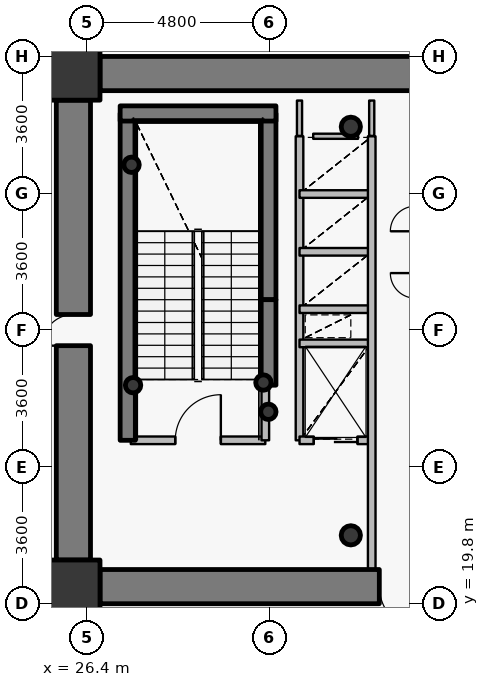
"""IFC4 building model, lengths in metres.
Left out: names, types, materials, properties, quantities, classifications, styles, units other than length and angle.
Written with IfcOpenShell. Run it as: python <this file> out.ifc"""

import sys

from ifc_helpers import new_model, si_unit, direction, frame, frame_2d, origin, origin_2d, place, context, subcontext, project, spatial, rectangle, hollow_circle, extrude, source, transform, mapped, element, fill, save


model = new_model("IFC4")
c1 = context("Model", 3, precision=1e-05, world=origin(), true_north=direction((0.0, 1.0)))
c2 = subcontext(c1, "Body", "Model", "MODEL_VIEW")
j1 = project(units=[si_unit("LENGTHUNIT", "METRE"), si_unit("PLANEANGLEUNIT", "RADIAN")], contexts=[c1])
p1 = place(None, origin())
s1 = spatial("IfcSite", under=j1, at=p1, CompositionType="ELEMENT")
p2 = place(p1, origin())
s2 = spatial("IfcBuilding", under=s1, at=p2, CompositionType="ELEMENT")
p3 = place(p2, frame((0.0, 0.0, 10.2)))
s3 = spatial("IfcBuildingStorey", under=s2, at=p3, CompositionType="ELEMENT", Elevation=10.2)
for number, where, z_axis, x_axis in (
    (1, (26.05, 20.25, 0.0), (0.0, 0.0, 1.0), (1.0, 0.0, 0.0)),
    (2, (26.05, 33.75, 0.0), (0.0, 0.0, 1.0), (1.0, 0.0, 0.0)),
):
    element("IfcColumn", number, at=place(p3, frame(where, z_axis=z_axis, x_axis=x_axis)), inside=s3, PredefinedType="COLUMN", context=c2, shape_type="SweptSolid", body=[
        extrude(rectangle(XDim=1.4, YDim=1.4, at=origin_2d()), origin(), (0.0, 0.0, 1.0), 4.2),
    ])
for number, where, z_axis, x_axis in (
    (3, (33.35, 21.6, 0.0), (0.0, 0.0, 1.0), (1.0, 0.0, 0.0)),
    (4, (33.35, 32.35, 0.0), (0.0, 0.0, 1.0), (1.0, 0.0, 0.0)),
):
    element("IfcColumn", number, at=place(p3, frame(where, z_axis=z_axis, x_axis=x_axis)), inside=s3, PredefinedType="COLUMN", context=c2, shape_type="SweptSolid", body=[
        extrude(hollow_circle(Radius=0.254, WallThickness=0.02, at=origin_2d()), origin(), (0.0, 0.0, 1.0), 4.2),
    ])
p4 = place(p3, frame((27.48, 24.1, 0.0), z_axis=(0.0, 0.0, 1.0), x_axis=(0.0, 1.0, 0.0)))
e5 = element("IfcWall", 5, at=p4, inside=s3, PredefinedType="SHEAR", context=c2, shape_type="SweptSolid", body=[
    extrude(rectangle(XDim=8.6, YDim=0.4, at=frame_2d((4.3, 0.0))), origin(), (0.0, 0.0, 1.0), 4.2),
])
p5 = place(p3, frame((31.18, 27.8, 0.0), z_axis=(0.0, 0.0, 1.0), x_axis=(0.0, 1.0, 0.0)))
e6 = element("IfcWall", 6, at=p5, inside=s3, PredefinedType="SHEAR", context=c2, shape_type="SweptSolid", body=[
    extrude(rectangle(XDim=4.9, YDim=0.4, at=frame_2d((2.45, 0.0))), origin(), (0.0, 0.0, 1.0), 4.2),
])
p6 = place(p3, frame((27.28, 32.7, 0.0), z_axis=(0.0, 0.0, 1.0), x_axis=(1.0, 0.0, 0.0)))
e7 = element("IfcWall", 7, at=p6, inside=s3, PredefinedType="SHEAR", context=c2, shape_type="SweptSolid", body=[
    extrude(rectangle(XDim=4.1, YDim=0.4, at=frame_2d((2.05, 0.0))), origin(), (0.0, 0.0, 1.0), 4.2),
])
for number, where, z_axis, x_axis in (
    (8, (27.58, 31.35, 0.0), (0.0, 0.0, 1.0), (1.0, 0.0, 0.0)),
    (9, (31.05, 25.62, 0.0), (0.0, 0.0, 1.0), (1.0, 0.0, 0.0)),
    (10, (31.18, 24.85, 0.0), (0.0, 0.0, 1.0), (1.0, 0.0, 0.0)),
    (11, (27.62, 25.55, 0.0), (0.0, 0.0, 1.0), (1.0, 0.0, 0.0)),
):
    element("IfcColumn", number, at=place(p3, frame(where, z_axis=z_axis, x_axis=x_axis)), inside=s3, PredefinedType="COLUMN", context=c2, shape_type="SweptSolid", body=[
        extrude(hollow_circle(Radius=0.203, WallThickness=0.016, at=origin_2d()), origin(), (0.0, 0.0, 1.0), 4.2),
    ])
p7 = place(p3, frame((26.75, 33.75, 0.0), z_axis=(0.0, 0.0, 1.0), x_axis=(1.0, 0.0, 0.0)))
e12 = element("IfcWall", 12, at=p7, inside=s3, PredefinedType="SHEAR", context=c2, shape_type="SweptSolid", body=[
    extrude(rectangle(XDim=18.5, YDim=0.9, at=frame_2d((9.25, 0.0))), origin(), (0.0, 0.0, 1.0), 3.35),
])
p8 = place(p3, frame((45.25, 20.25, 0.0), z_axis=(0.0, 0.0, 1.0), x_axis=(-1.0, 0.0, 0.0)))
e13 = element("IfcWall", 13, at=p8, inside=s3, PredefinedType="SHEAR", context=c2, shape_type="SweptSolid", body=[
    extrude(rectangle(XDim=18.5, YDim=0.9, at=frame_2d((9.25, 0.0))), origin(), (0.0, 0.0, 1.0), 3.35),
])
p9 = place(p8, frame((10.0, 0.0, 0.0)))
e14 = element("IfcOpeningElement", 14, at=p9, cuts=e13, PredefinedType="OPENING", context=c2, shape_type="SweptSolid", body=[
    extrude(rectangle(XDim=1.15, YDim=2.15, at=origin_2d()), frame((0.575, 0.46, 1.075), z_axis=(0.0, -1.0, 0.0), x_axis=(1.0, 0.0, 0.0)), (0.0, 0.0, 1.0), 0.92),
])
p10 = place(p3, frame((26.05, 20.95, 0.0), z_axis=(0.0, 0.0, 1.0), x_axis=(0.0, 1.0, 0.0)))
e15 = element("IfcWall", 15, at=p10, inside=s3, PredefinedType="SHEAR", context=c2, shape_type="SweptSolid", body=[
    extrude(rectangle(XDim=12.1, YDim=0.9, at=frame_2d((6.05, 0.0))), origin(), (0.0, 0.0, 1.0), 3.35),
])
p11 = place(p10, frame((5.64, 0.0, 0.0)))
e16 = element("IfcOpeningElement", 16, at=p11, cuts=e15, PredefinedType="OPENING", context=c2, shape_type="SweptSolid", body=[
    extrude(rectangle(XDim=0.82, YDim=2.1, at=origin_2d()), frame((0.41, 0.46, 1.05), z_axis=(0.0, -1.0, 0.0), x_axis=(1.0, 0.0, 0.0)), (0.0, 0.0, 1.0), 0.92),
])
p12 = place(p3, frame((31.18, 25.55, 0.0), z_axis=(0.0, 0.0, 1.0), x_axis=(0.0, 1.0, 0.0)))
e17 = element("IfcWall", 17, at=p12, inside=s3, PredefinedType="SHEAR", context=c2, shape_type="SweptSolid", body=[
    extrude(rectangle(XDim=2.25, YDim=0.4, at=frame_2d((1.125, 0.0))), origin(), (0.0, 0.0, 1.0), 3.5),
])
p13 = place(p3, frame((27.56, 24.1, 0.0), z_axis=(0.0, 0.0, 1.0), x_axis=(1.0, 0.0, 0.0)))
e18 = element("IfcWall", 18, at=p13, inside=s3, PredefinedType="PARTITIONING", context=c2, shape_type="SweptSolid", body=[
    extrude(rectangle(XDim=3.54, YDim=0.2, at=frame_2d((1.77, 0.0))), origin(), (0.0, 0.0, 1.0), 3.9),
])
p14 = place(p13, frame((1.17, 0.0, 0.0)))
e19 = element("IfcOpeningElement", 19, at=p14, cuts=e18, PredefinedType="OPENING", context=c2, shape_type="SweptSolid", body=[
    extrude(rectangle(XDim=1.2, YDim=2.15, at=origin_2d()), frame((0.6, 0.11, 1.075), z_axis=(0.0, -1.0, 0.0), x_axis=(1.0, 0.0, 0.0)), (0.0, 0.0, 1.0), 0.22),
])
p15 = place(p3, frame((31.1, 24.1, 0.0), z_axis=(0.0, 0.0, 1.0), x_axis=(0.0, 1.0, 0.0)))
e20 = element("IfcWall", 20, at=p15, inside=s3, PredefinedType="PARTITIONING", context=c2, shape_type="SweptSolid", body=[
    extrude(rectangle(XDim=1.44, YDim=0.2, at=frame_2d((0.72, 0.0))), origin(), (0.0, 0.0, 1.0), 3.9),
])
p16 = place(p3, frame((32.0, 24.1, 0.0), z_axis=(0.0, 0.0, 1.0), x_axis=(0.0, 1.0, 0.0)))
e21 = element("IfcWall", 21, at=p16, inside=s3, PredefinedType="PARTITIONING", context=c2, shape_type="SweptSolid", body=[
    extrude(rectangle(XDim=8.0, YDim=0.2, at=frame_2d((4.0, 0.0))), origin(), (0.0, 0.0, 1.0), 3.9),
])
p17 = place(p3, frame((32.0, 24.1, 0.0), z_axis=(0.0, 0.0, 1.0), x_axis=(1.0, 0.0, 0.0)))
e22 = element("IfcWall", 22, at=p17, inside=s3, PredefinedType="PARTITIONING", context=c2, shape_type="SweptSolid", body=[
    extrude(rectangle(XDim=1.9, YDim=0.2, at=frame_2d((0.95, 0.0))), origin(), (0.0, 0.0, 1.0), 3.485),
])
p18 = place(p17, frame((0.375, 0.0, 0.0)))
e23 = element("IfcOpeningElement", 23, at=p18, cuts=e22, PredefinedType="OPENING", context=c2, shape_type="SweptSolid", body=[
    extrude(rectangle(XDim=1.15, YDim=2.15, at=origin_2d()), frame((0.575, 0.11, 1.075), z_axis=(0.0, -1.0, 0.0), x_axis=(1.0, 0.0, 0.0)), (0.0, 0.0, 1.0), 0.22),
])
for number, where, z_axis, x_axis in (
    (24, (32.0, 26.65, 0.0), (0.0, 0.0, 1.0), (1.0, 0.0, 0.0)),
    (25, (32.0, 27.55, 0.0), (0.0, 0.0, 1.0), (1.0, 0.0, 0.0)),
    (26, (32.0, 29.06, 0.0), (0.0, 0.0, 1.0), (1.0, 0.0, 0.0)),
    (27, (32.0, 30.58, 0.0), (0.0, 0.0, 1.0), (1.0, 0.0, 0.0)),
):
    element("IfcWall", number, at=place(p3, frame(where, z_axis=z_axis, x_axis=x_axis)), inside=s3, PredefinedType="PARTITIONING", context=c2, shape_type="SweptSolid", body=[
        extrude(rectangle(XDim=1.9, YDim=0.2, at=frame_2d((0.95, 0.0))), origin(), (0.0, 0.0, 1.0), 3.485),
    ])
p19 = place(p3, frame((33.9, 20.7, 0.0), z_axis=(0.0, 0.0, 1.0), x_axis=(0.0, 1.0, 0.0)))
e28 = element("IfcWall", 28, at=p19, inside=s3, PredefinedType="PARTITIONING", context=c2, shape_type="SweptSolid", body=[
    extrude(rectangle(XDim=11.4, YDim=0.2, at=frame_2d((5.7, 0.0))), origin(), (0.0, 0.0, 1.0), 3.485),
])
p20 = place(p3, frame((32.36, 32.1, 0.0), z_axis=(0.0, 0.0, 1.0), x_axis=(1.0, 0.0, 0.0)))
e29 = element("IfcWall", 29, at=p20, inside=s3, PredefinedType="PARTITIONING", context=c2, shape_type="SweptSolid", body=[
    extrude(rectangle(XDim=1.18, YDim=0.135, at=frame_2d((0.59, 0.0))), origin(), (0.0, 0.0, 1.0), 3.485),
])
p21 = place(p3, frame((32.0, 33.04, 0.0), z_axis=(0.0, 0.0, 1.0), x_axis=(0.0, -1.0, 0.0)))
e30 = element("IfcWall", 30, at=p21, inside=s3, PredefinedType="PARTITIONING", context=c2, shape_type="SweptSolid", body=[
    extrude(rectangle(XDim=0.93, YDim=0.135, at=frame_2d((0.465, 0.0))), origin(), (0.0, 0.0, 1.0), 3.435),
])
p22 = place(p3, frame((33.9, 32.11, 0.0), z_axis=(0.0, 0.0, 1.0), x_axis=(0.0, 1.0, 0.0)))
e31 = element("IfcWall", 31, at=p22, inside=s3, PredefinedType="PARTITIONING", context=c2, shape_type="SweptSolid", body=[
    extrude(rectangle(XDim=0.93, YDim=0.135, at=frame_2d((0.465, 0.0))), origin(), (0.0, 0.0, 1.0), 3.485),
])
p23 = place(p3, frame((25.95, 38.893, 0.0), z_axis=(0.0, 0.0, 1.0), x_axis=(0.0, -1.0, 0.0)))
e32 = element("IfcWall", 32, at=p23, inside=s3, PredefinedType="PARTITIONING", context=c2, shape_type="SweptSolid", body=[
    extrude(rectangle(XDim=4.693, YDim=0.135, at=frame_2d((2.346, 0.0))), origin(), (0.0, 0.0, 1.0), 3.085),
])
for number, where, z_axis, x_axis in (
    (33, (25.6, 34.2, 0.0), (0.0, 0.0, 1.0), (0.0, -1.0, 0.0)),
    (34, (25.6, 20.94, 0.0), (0.0, 0.0, 1.0), (0.0, -1.0, 0.0)),
):
    element("IfcWall", number, at=place(p3, frame(where, z_axis=z_axis, x_axis=x_axis)), inside=s3, PredefinedType="PARTITIONING", context=c2, shape_type="SweptSolid", body=[
        extrude(rectangle(XDim=1.14, YDim=0.135, at=frame_2d((0.57, 0.0))), origin(), (0.0, 0.0, 1.0), 3.9),
    ])
p24 = place(p3, frame((25.907, 19.8, 0.0), z_axis=(0.0, 0.0, 1.0), x_axis=(1.0, 0.0, 0.0)))
e35 = element("IfcWall", 35, at=p24, inside=s3, PredefinedType="PARTITIONING", context=c2, shape_type="SweptSolid", body=[
    extrude(rectangle(XDim=0.833, YDim=0.135, at=frame_2d((0.416, 0.0))), origin(), (0.0, 0.0, 1.0), 3.085),
])
m1 = source(origin(), c2, "Body", "SweptSolid", [
    extrude(rectangle(XDim=0.82, YDim=2.1, at=origin_2d()), frame((0.41, 0.025, 1.05), z_axis=(0.0, -1.0, 0.0), x_axis=(1.0, 0.0, 0.0)), (0.0, 0.0, 1.0), 0.05),
])
p25 = place(p11, origin())
e36 = element("IfcDoor", 36, at=p25, inside=s3, OperationType="SINGLE_SWING_LEFT", PredefinedType="DOOR", context=c2, shape_type="MappedRepresentation", body=[
    mapped(m1, transform((0.0, 0.0, 0.0), x_axis=(1.0, 0.0, 0.0), y_axis=(0.0, 1.0, 0.0), z_axis=(0.0, 0.0, 1.0), scale=1.0)),
])
fill(e16, e36)
m2 = source(origin(), c2, "Body", "SweptSolid", [
    extrude(rectangle(XDim=1.15, YDim=2.15, at=origin_2d()), frame((0.575, 0.025, 1.075), z_axis=(0.0, -1.0, 0.0), x_axis=(1.0, 0.0, 0.0)), (0.0, 0.0, 1.0), 0.05),
])
p26 = place(p9, origin())
e37 = element("IfcDoor", 37, at=p26, inside=s3, OperationType="SINGLE_SWING_LEFT", PredefinedType="DOOR", context=c2, shape_type="MappedRepresentation", body=[
    mapped(m2, transform((0.0, 0.0, 0.0), x_axis=(1.0, 0.0, 0.0), y_axis=(0.0, 1.0, 0.0), z_axis=(0.0, 0.0, 1.0), scale=1.0)),
])
fill(e14, e37)
m3 = source(origin(), c2, "Body", "SweptSolid", [
    extrude(rectangle(XDim=1.2, YDim=2.15, at=origin_2d()), frame((0.6, 0.025, 1.075), z_axis=(0.0, -1.0, 0.0), x_axis=(1.0, 0.0, 0.0)), (0.0, 0.0, 1.0), 0.05),
])
p27 = place(p14, origin())
e38 = element("IfcDoor", 38, at=p27, inside=s3, OperationType="SINGLE_SWING_RIGHT", PredefinedType="DOOR", context=c2, shape_type="MappedRepresentation", body=[
    mapped(m3, transform((0.0, 0.0, 0.0), x_axis=(1.0, 0.0, 0.0), y_axis=(0.0, 1.0, 0.0), z_axis=(0.0, 0.0, 1.0), scale=1.0)),
])
fill(e19, e38)
m4 = source(origin(), c2, "Body", "SweptSolid", [
    extrude(rectangle(XDim=1.15, YDim=2.15, at=origin_2d()), frame((0.575, 0.025, 1.075), z_axis=(0.0, -1.0, 0.0), x_axis=(1.0, 0.0, 0.0)), (0.0, 0.0, 1.0), 0.05),
])
p28 = place(p18, origin())
e39 = element("IfcDoor", 39, at=p28, inside=s3, OperationType="DOUBLE_DOOR_SLIDING", PredefinedType="USERDEFINED", context=c2, shape_type="MappedRepresentation", body=[
    mapped(m4, transform((0.0, 0.0, 0.0), x_axis=(1.0, 0.0, 0.0), y_axis=(0.0, 1.0, 0.0), z_axis=(0.0, 0.0, 1.0), scale=1.0)),
])
fill(e23, e39)
save(model, sys.argv[1])
